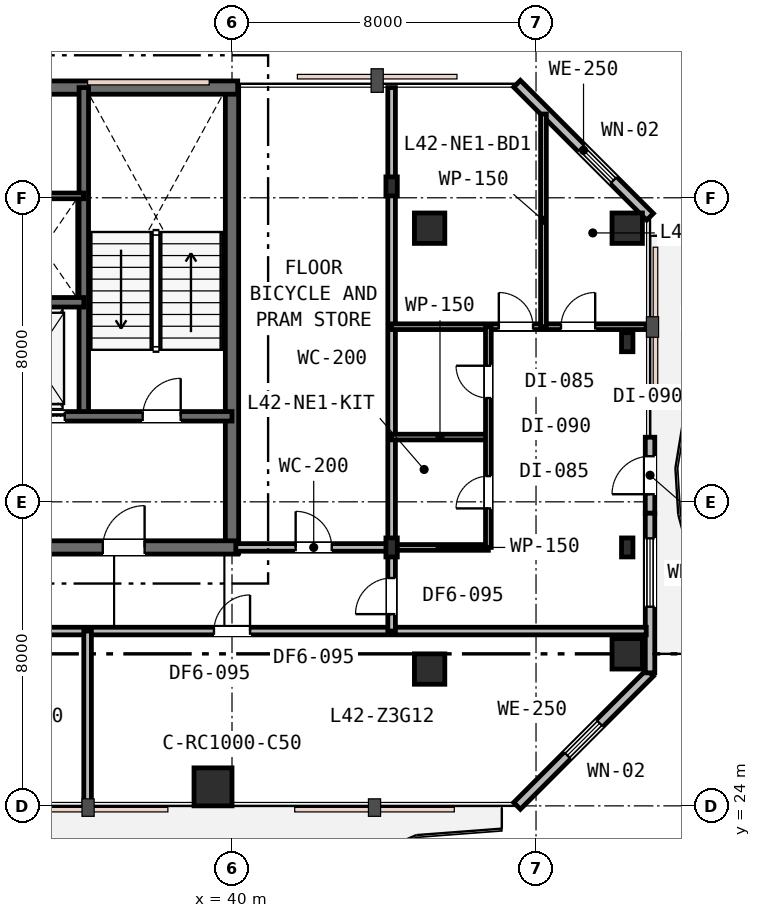
"""IFC4 building model, lengths in metres.
Left out: names, types, materials, properties, quantities, classifications, styles, units other than length and angle.
Written with IfcOpenShell. Run it as: python <this file> out.ifc"""

import sys

from ifc_helpers import new_model, si_unit, direction, frame, frame_2d, origin, origin_2d, place, context, subcontext, project, spatial, rectangle, i_section, extrude, element, fill, save


model = new_model("IFC4")
c1 = context("Model", 3, precision=1e-05, world=origin(), true_north=direction((0.0, 1.0)))
c2 = subcontext(c1, "Body", "Model", "MODEL_VIEW")
j1 = project(units=[si_unit("LENGTHUNIT", "METRE"), si_unit("PLANEANGLEUNIT", "RADIAN")], contexts=[c1])
p1 = place(None, origin())
s1 = spatial("IfcSite", under=j1, at=p1, CompositionType="ELEMENT")
p2 = place(p1, origin())
s2 = spatial("IfcBuilding", under=s1, at=p2, CompositionType="ELEMENT")
p3 = place(p2, frame((0.0, 0.0, 165.0)))
s3 = spatial("IfcBuildingStorey", under=s2, at=p3, CompositionType="ELEMENT", Elevation=165.0)
p4 = place(p3, frame((40.0, 30.65, 0.0), z_axis=(0.0, 0.0, 1.0), x_axis=(0.0, 1.0, 0.0)))
e1 = element("IfcWall", 1, at=p4, inside=s3, PredefinedType="SHEAR", context=c2, shape_type="SweptSolid", body=[
    extrude(rectangle(XDim=12.3, YDim=0.35, at=frame_2d((6.15, 0.0))), origin(), (0.0, 0.0, 1.0), 3.6),
])
p5 = place(p3, frame((15.85, 42.9, 0.0), z_axis=(0.0, 0.0, 1.0), x_axis=(1.0, 0.0, 0.0)))
e2 = element("IfcWall", 2, at=p5, inside=s3, PredefinedType="SHEAR", context=c2, shape_type="SweptSolid", body=[
    extrude(rectangle(XDim=24.3, YDim=0.35, at=frame_2d((12.15, 0.0))), origin(), (0.0, 0.0, 1.0), 3.6),
])
p6 = place(p3, frame((28.95, 30.8, 0.0), z_axis=(0.0, 0.0, 1.0), x_axis=(1.0, 0.0, 0.0)))
e3 = element("IfcWall", 3, at=p6, inside=s3, PredefinedType="SHEAR", context=c2, shape_type="SweptSolid", body=[
    extrude(rectangle(XDim=11.2, YDim=0.35, at=frame_2d((5.6, 0.0))), origin(), (0.0, 0.0, 1.0), 3.6),
])
p7 = place(p6, frame((7.65, 0.0, 0.0)))
e4 = element("IfcOpeningElement", 4, at=p7, cuts=e3, PredefinedType="OPENING", context=c2, shape_type="SweptSolid", body=[
    extrude(rectangle(XDim=1.1, YDim=2.15, at=frame_2d((0.55, 1.075))), frame((0.0, 0.185, 0.0), z_axis=(0.0, -1.0, 0.0), x_axis=(1.0, 0.0, 0.0)), (0.0, 0.0, 1.0), 0.37),
])
p8 = place(p3, frame((36.1, 34.25, 0.0), z_axis=(0.0, 0.0, 1.0), x_axis=(0.0, 1.0, 0.0)))
e5 = element("IfcWall", 5, at=p8, inside=s3, PredefinedType="SHEAR", context=c2, shape_type="SweptSolid", body=[
    extrude(rectangle(XDim=8.65, YDim=0.25, at=frame_2d((4.325, 0.0))), origin(), (0.0, 0.0, 1.0), 3.6),
])
p9 = place(p3, frame((33.95, 34.25, 0.0), z_axis=(0.0, 0.0, 1.0), x_axis=(1.0, 0.0, 0.0)))
e6 = element("IfcWall", 6, at=p9, inside=s3, PredefinedType="SHEAR", context=c2, shape_type="SweptSolid", body=[
    extrude(rectangle(XDim=6.05, YDim=0.25, at=frame_2d((3.025, 0.0))), origin(), (0.0, 0.0, 1.0), 3.6),
])
p10 = place(p9, frame((3.7, 0.0, 0.0)))
e7 = element("IfcOpeningElement", 7, at=p10, cuts=e6, PredefinedType="OPENING", context=c2, shape_type="SweptSolid", body=[
    extrude(rectangle(XDim=1.0, YDim=2.15, at=frame_2d((0.5, 1.075))), frame((0.0, 0.135, 0.0), z_axis=(0.0, -1.0, 0.0), x_axis=(1.0, 0.0, 0.0)), (0.0, 0.0, 1.0), 0.27),
])
p11 = place(p9, frame((0.55, 0.0, 0.0)))
e8 = element("IfcOpeningElement", 8, at=p11, cuts=e6, PredefinedType="OPENING", context=c2, shape_type="SweptSolid", body=[
    extrude(rectangle(XDim=1.1, YDim=2.15, at=frame_2d((0.55, 1.075))), frame((0.0, 0.135, 0.0), z_axis=(0.0, -1.0, 0.0), x_axis=(1.0, 0.0, 0.0)), (0.0, 0.0, 1.0), 0.27),
])
p12 = place(p3, frame((19.9, 37.25, 0.0), z_axis=(0.0, 0.0, 1.0), x_axis=(1.0, 0.0, 0.0)))
e9 = element("IfcWall", 9, at=p12, inside=s3, PredefinedType="SHEAR", context=c2, shape_type="SweptSolid", body=[
    extrude(rectangle(XDim=16.2, YDim=0.25, at=frame_2d((8.1, 0.0))), origin(), (0.0, 0.0, 1.0), 3.6),
])
p13 = place(p12, frame((12.55, 0.0, 0.0)))
e10 = element("IfcOpeningElement", 10, at=p13, cuts=e9, PredefinedType="OPENING", context=c2, shape_type="SweptSolid", body=[
    extrude(rectangle(XDim=0.9, YDim=2.15, at=frame_2d((0.45, 1.075))), frame((0.0, 0.135, 0.0), z_axis=(0.0, -1.0, 0.0), x_axis=(1.0, 0.0, 0.0)), (0.0, 0.0, 1.0), 0.27),
])
p14 = place(p12, frame((2.5, 0.0, 0.0)))
e11 = element("IfcOpeningElement", 11, at=p14, cuts=e9, PredefinedType="OPENING", context=c2, shape_type="SweptSolid", body=[
    extrude(rectangle(XDim=1.05, YDim=2.15, at=frame_2d((0.525, 1.075))), frame((0.0, 0.135, 0.0), z_axis=(0.0, -1.0, 0.0), x_axis=(1.0, 0.0, 0.0)), (0.0, 0.0, 1.0), 0.27),
])
p15 = place(p12, frame((4.4, 0.0, 0.0)))
e12 = element("IfcOpeningElement", 12, at=p15, cuts=e9, PredefinedType="OPENING", context=c2, shape_type="SweptSolid", body=[
    extrude(rectangle(XDim=1.05, YDim=2.15, at=frame_2d((0.525, 1.075))), frame((0.0, 0.135, 0.0), z_axis=(0.0, -1.0, 0.0), x_axis=(1.0, 0.0, 0.0)), (0.0, 0.0, 1.0), 0.27),
])
p16 = place(p12, frame((6.3, 0.0, 0.0)))
e13 = element("IfcOpeningElement", 13, at=p16, cuts=e9, PredefinedType="OPENING", context=c2, shape_type="SweptSolid", body=[
    extrude(rectangle(XDim=1.05, YDim=2.15, at=frame_2d((0.525, 1.075))), frame((0.0, 0.135, 0.0), z_axis=(0.0, -1.0, 0.0), x_axis=(1.0, 0.0, 0.0)), (0.0, 0.0, 1.0), 0.27),
])
p17 = place(p3, frame((39.5, 24.5, 0.0), z_axis=(0.0, 0.0, 1.0), x_axis=(1.0, 0.0, 0.0)))
e14 = element("IfcColumn", 14, at=p17, inside=s3, PredefinedType="COLUMN", context=c2, shape_type="SweptSolid", body=[
    extrude(rectangle(XDim=1.0, YDim=1.0, at=origin_2d()), origin(), (0.0, 0.0, 1.0), 3.6),
])
for number, where, z_axis, x_axis in (
    (15, (45.2, 27.6, 0.0), (0.0, 0.0, 1.0), (1.0, 0.0, 0.0)),
    (16, (45.2, 39.2, 0.0), (0.0, 0.0, 1.0), (1.0, 0.0, 0.0)),
    (17, (50.4, 28.0, 0.0), (0.0, 0.0, 1.0), (1.0, 0.0, 0.0)),
    (18, (50.4, 39.2, 0.0), (0.0, 0.0, 1.0), (1.0, 0.0, 0.0)),
):
    element("IfcColumn", number, at=place(p3, frame(where, z_axis=z_axis, x_axis=x_axis)), inside=s3, PredefinedType="COLUMN", context=c2, shape_type="SweptSolid", body=[
        extrude(rectangle(XDim=0.8, YDim=0.8, at=origin_2d()), origin(), (0.0, 0.0, 1.0), 3.6),
    ])
for number, where, z_axis, x_axis in (
    (19, (44.2, 30.8, 0.0), (0.0, 0.0, 1.0), (1.0, 0.0, 0.0)),
    (20, (44.2, 40.3, 0.0), (0.0, 0.0, 1.0), (1.0, 0.0, 0.0)),
    (21, (50.4, 30.8, 0.0), (0.0, 0.0, 1.0), (1.0, 0.0, 0.0)),
    (22, (50.4, 36.2, 0.0), (0.0, 0.0, 1.0), (1.0, 0.0, 0.0)),
):
    element("IfcColumn", number, at=place(p3, frame(where, z_axis=z_axis, x_axis=x_axis)), inside=s3, PredefinedType="COLUMN", context=c2, shape_type="SweptSolid", body=[
        extrude(i_section(OverallWidth=0.3, OverallDepth=0.5, WebThickness=0.015, FlangeThickness=0.028, FilletRadius=0.027, at=origin_2d()), origin(), (0.0, 0.0, 1.0), 3.6),
    ])
p18 = place(p3, frame((47.5, 24.0, 0.0), z_axis=(0.0, 0.0, 1.0), x_axis=(0.707106781187, 0.707106781187, 0.0)))
e23 = element("IfcWall", 23, at=p18, inside=s3, PredefinedType="STANDARD", context=c2, shape_type="SweptSolid", body=[
    extrude(rectangle(XDim=4.95, YDim=0.25, at=frame_2d((2.475, 0.0))), origin(), (0.0, 0.0, 1.0), 3.33),
])
p19 = place(p18, frame((1.875, 0.0, 0.85)))
e24 = element("IfcOpeningElement", 24, at=p19, cuts=e23, PredefinedType="OPENING", context=c2, shape_type="SweptSolid", body=[
    extrude(rectangle(XDim=1.2, YDim=1.6, at=frame_2d((0.6, 0.8))), frame((0.0, 0.135, 0.0), z_axis=(0.0, -1.0, 0.0), x_axis=(1.0, 0.0, 0.0)), (0.0, 0.0, 1.0), 0.27),
])
p20 = place(p3, frame((51.0, 31.7, 0.0), z_axis=(0.0, 0.0, 1.0), x_axis=(0.0, 1.0, 0.0)))
e25 = element("IfcWall", 25, at=p20, inside=s3, PredefinedType="STANDARD", context=c2, shape_type="SweptSolid", body=[
    extrude(rectangle(XDim=2.0, YDim=0.25, at=frame_2d((1.0, 0.0))), origin(), (0.0, 0.0, 1.0), 3.33),
])
p21 = place(p20, frame((0.5, 0.0, 0.0)))
e26 = element("IfcOpeningElement", 26, at=p21, cuts=e25, PredefinedType="OPENING", context=c2, shape_type="SweptSolid", body=[
    extrude(rectangle(XDim=1.0, YDim=2.15, at=frame_2d((0.5, 1.075))), frame((0.0, 0.135, 0.0), z_axis=(0.0, -1.0, 0.0), x_axis=(1.0, 0.0, 0.0)), (0.0, 0.0, 1.0), 0.27),
])
p22 = place(p3, frame((51.0, 27.5, 0.0), z_axis=(0.0, 0.0, 1.0), x_axis=(0.0, 1.0, 0.0)))
e27 = element("IfcWall", 27, at=p22, inside=s3, PredefinedType="STANDARD", context=c2, shape_type="SweptSolid", body=[
    extrude(rectangle(XDim=4.2, YDim=0.25, at=frame_2d((2.1, 0.0))), origin(), (0.0, 0.0, 1.0), 3.33),
])
p23 = place(p22, frame((1.74, 0.0, 0.75)))
e28 = element("IfcOpeningElement", 28, at=p23, cuts=e27, PredefinedType="OPENING", context=c2, shape_type="SweptSolid", body=[
    extrude(rectangle(XDim=1.8, YDim=1.85, at=frame_2d((0.9, 0.925))), frame((0.0, 0.135, 0.0), z_axis=(0.0, -1.0, 0.0), x_axis=(1.0, 0.0, 0.0)), (0.0, 0.0, 1.0), 0.27),
])
p24 = place(p3, frame((51.0, 39.5, 0.0), z_axis=(0.0, 0.0, 1.0), x_axis=(-0.707106781187, 0.707106781187, 0.0)))
e29 = element("IfcWall", 29, at=p24, inside=s3, PredefinedType="STANDARD", context=c2, shape_type="SweptSolid", body=[
    extrude(rectangle(XDim=4.95, YDim=0.25, at=frame_2d((2.475, 0.0))), origin(), (0.0, 0.0, 1.0), 3.33),
])
p25 = place(p24, frame((1.357, 0.0, 0.85)))
e30 = element("IfcOpeningElement", 30, at=p25, cuts=e29, PredefinedType="OPENING", context=c2, shape_type="SweptSolid", body=[
    extrude(rectangle(XDim=1.2, YDim=1.6, at=frame_2d((0.6, 0.8))), frame((0.0, 0.135, 0.0), z_axis=(0.0, -1.0, 0.0), x_axis=(1.0, 0.0, 0.0)), (0.0, 0.0, 1.0), 0.27),
])
p26 = place(p3, frame((34.05, 40.05, 0.0), z_axis=(0.0, 0.0, 1.0), x_axis=(1.0, 0.0, 0.0)))
e31 = element("IfcWall", 31, at=p26, inside=s3, PredefinedType="PARTITIONING", context=c2, shape_type="SweptSolid", body=[
    extrude(rectangle(XDim=2.05, YDim=0.15, at=frame_2d((1.025, 0.0))), origin(), (0.0, 0.0, 1.0), 3.33),
])
p27 = place(p3, frame((13.6, 28.6, 0.0), z_axis=(0.0, 0.0, 1.0), x_axis=(1.0, 0.0, 0.0)))
e32 = element("IfcWall", 32, at=p27, inside=s3, PredefinedType="PARTITIONING", context=c2, shape_type="SweptSolid", body=[
    extrude(rectangle(XDim=37.3, YDim=0.2, at=frame_2d((18.65, 0.0))), origin(), (0.0, 0.0, 1.0), 2.93),
])
p28 = place(p27, frame((16.025, 0.0, 0.0)))
e33 = element("IfcOpeningElement", 33, at=p28, cuts=e32, PredefinedType="OPENING", context=c2, shape_type="SweptSolid", body=[
    extrude(rectangle(XDim=0.95, YDim=2.15, at=frame_2d((0.475, 1.075))), frame((0.0, 0.11, 0.0), z_axis=(0.0, -1.0, 0.0), x_axis=(1.0, 0.0, 0.0)), (0.0, 0.0, 1.0), 0.22),
])
p29 = place(p27, frame((25.925, 0.0, 0.0)))
e34 = element("IfcOpeningElement", 34, at=p29, cuts=e32, PredefinedType="OPENING", context=c2, shape_type="SweptSolid", body=[
    extrude(rectangle(XDim=0.95, YDim=2.15, at=frame_2d((0.475, 1.075))), frame((0.0, 0.11, 0.0), z_axis=(0.0, -1.0, 0.0), x_axis=(1.0, 0.0, 0.0)), (0.0, 0.0, 1.0), 0.22),
])
p30 = place(p3, frame((40.1, 30.8, 0.0), z_axis=(0.0, 0.0, 1.0), x_axis=(1.0, 0.0, 0.0)))
e35 = element("IfcWall", 35, at=p30, inside=s3, PredefinedType="PARTITIONING", context=c2, shape_type="SweptSolid", body=[
    extrude(rectangle(XDim=4.1, YDim=0.2, at=frame_2d((2.05, 0.0))), origin(), (0.0, 0.0, 1.0), 2.93),
])
p31 = place(p30, frame((1.575, 0.0, 0.0)))
e36 = element("IfcOpeningElement", 36, at=p31, cuts=e35, PredefinedType="OPENING", context=c2, shape_type="SweptSolid", body=[
    extrude(rectangle(XDim=0.95, YDim=2.15, at=frame_2d((0.475, 1.075))), frame((0.0, 0.11, 0.0), z_axis=(0.0, -1.0, 0.0), x_axis=(1.0, 0.0, 0.0)), (0.0, 0.0, 1.0), 0.22),
])
p32 = place(p3, frame((44.2, 28.6, 0.0), z_axis=(0.0, 0.0, 1.0), x_axis=(0.0, 1.0, 0.0)))
e37 = element("IfcWall", 37, at=p32, inside=s3, PredefinedType="PARTITIONING", context=c2, shape_type="SweptSolid", body=[
    extrude(rectangle(XDim=14.3, YDim=0.2, at=frame_2d((7.15, 0.0))), origin(), (0.0, 0.0, 1.0), 2.93),
])
p33 = place(p32, frame((0.445, 0.0, 0.0)))
e38 = element("IfcOpeningElement", 38, at=p33, cuts=e37, PredefinedType="OPENING", context=c2, shape_type="SweptSolid", body=[
    extrude(rectangle(XDim=0.95, YDim=2.15, at=frame_2d((0.475, 1.075))), frame((0.0, 0.11, 0.0), z_axis=(0.0, -1.0, 0.0), x_axis=(1.0, 0.0, 0.0)), (0.0, 0.0, 1.0), 0.22),
])
for number, where, z_axis, x_axis in (
    (39, (44.2, 30.8, 0.0), (0.0, 0.0, 1.0), (1.0, 0.0, 0.0)),
    (40, (44.2, 33.704, 0.0), (0.0, 0.0, 1.0), (1.0, 0.0, 0.0)),
):
    element("IfcWall", number, at=place(p3, frame(where, z_axis=z_axis, x_axis=x_axis)), inside=s3, PredefinedType="PARTITIONING", context=c2, shape_type="SweptSolid", body=[
        extrude(rectangle(XDim=2.546, YDim=0.15, at=frame_2d((1.273, 0.0))), origin(), (0.0, 0.0, 1.0), 2.93),
    ])
p34 = place(p3, frame((44.2, 36.608, 0.0), z_axis=(0.0, 0.0, 1.0), x_axis=(1.0, 0.0, 0.0)))
e41 = element("IfcWall", 41, at=p34, inside=s3, PredefinedType="PARTITIONING", context=c2, shape_type="SweptSolid", body=[
    extrude(rectangle(XDim=6.7, YDim=0.15, at=frame_2d((3.35, 0.0))), origin(), (0.0, 0.0, 1.0), 2.93),
])
p35 = place(p34, frame((2.821, 0.0, 0.0)))
e42 = element("IfcOpeningElement", 42, at=p35, cuts=e41, PredefinedType="OPENING", context=c2, shape_type="SweptSolid", body=[
    extrude(rectangle(XDim=0.9, YDim=2.15, at=frame_2d((0.45, 1.075))), frame((0.0, 0.085, 0.0), z_axis=(0.0, -1.0, 0.0), x_axis=(1.0, 0.0, 0.0)), (0.0, 0.0, 1.0), 0.17),
])
p36 = place(p34, frame((4.457, 0.0, 0.0)))
e43 = element("IfcOpeningElement", 43, at=p36, cuts=e41, PredefinedType="OPENING", context=c2, shape_type="SweptSolid", body=[
    extrude(rectangle(XDim=0.9, YDim=2.15, at=frame_2d((0.45, 1.075))), frame((0.0, 0.085, 0.0), z_axis=(0.0, -1.0, 0.0), x_axis=(1.0, 0.0, 0.0)), (0.0, 0.0, 1.0), 0.17),
])
p37 = place(p3, frame((46.746, 30.8, 0.0), z_axis=(0.0, 0.0, 1.0), x_axis=(0.0, 1.0, 0.0)))
e44 = element("IfcWall", 44, at=p37, inside=s3, PredefinedType="PARTITIONING", context=c2, shape_type="SweptSolid", body=[
    extrude(rectangle(XDim=5.808, YDim=0.15, at=frame_2d((2.904, 0.0))), origin(), (0.0, 0.0, 1.0), 2.93),
])
p38 = place(p37, frame((1.027, 0.0, 0.0)))
e45 = element("IfcOpeningElement", 45, at=p38, cuts=e44, PredefinedType="OPENING", context=c2, shape_type="SweptSolid", body=[
    extrude(rectangle(XDim=0.85, YDim=2.15, at=frame_2d((0.425, 1.075))), frame((0.0, 0.085, 0.0), z_axis=(0.0, -1.0, 0.0), x_axis=(1.0, 0.0, 0.0)), (0.0, 0.0, 1.0), 0.17),
])
p39 = place(p37, frame((3.931, 0.0, 0.0)))
e46 = element("IfcOpeningElement", 46, at=p39, cuts=e44, PredefinedType="OPENING", context=c2, shape_type="SweptSolid", body=[
    extrude(rectangle(XDim=0.85, YDim=2.15, at=frame_2d((0.425, 1.075))), frame((0.0, 0.085, 0.0), z_axis=(0.0, -1.0, 0.0), x_axis=(1.0, 0.0, 0.0)), (0.0, 0.0, 1.0), 0.17),
])
p40 = place(p3, frame((48.196, 36.608, 0.0), z_axis=(0.0, 0.0, 1.0), x_axis=(0.0, 1.0, 0.0)))
e47 = element("IfcWall", 47, at=p40, inside=s3, PredefinedType="PARTITIONING", context=c2, shape_type="SweptSolid", body=[
    extrude(rectangle(XDim=5.596, YDim=0.15, at=frame_2d((2.798, 0.0))), origin(), (0.0, 0.0, 1.0), 3.01),
])
p41 = place(p3, frame((36.2, 24.1, 0.0), z_axis=(0.0, 0.0, 1.0), x_axis=(0.0, 1.0, 0.0)))
e48 = element("IfcWall", 48, at=p41, inside=s3, PredefinedType="PARTITIONING", context=c2, shape_type="SweptSolid", body=[
    extrude(rectangle(XDim=4.5, YDim=0.2, at=frame_2d((2.25, 0.0))), origin(), (0.0, 0.0, 1.0), 3.01),
])
p42 = place(p19, origin())
e49 = element("IfcWindow", 49, at=p42, inside=s3, PartitioningType="SINGLE_PANEL", PredefinedType="WINDOW", context=c2, shape_type="SweptSolid", body=[
    extrude(rectangle(XDim=1.2, YDim=1.6, at=frame_2d((0.6, 0.8))), frame((0.0, 0.03, 0.0), z_axis=(0.0, -1.0, 0.0), x_axis=(1.0, 0.0, 0.0)), (0.0, 0.0, 1.0), 0.06),
])
fill(e24, e49)
p43 = place(p21, origin())
e50 = element("IfcDoor", 50, at=p43, inside=s3, OperationType="SINGLE_SWING_LEFT", PredefinedType="DOOR", context=c2, shape_type="SweptSolid", body=[
    extrude(rectangle(XDim=1.0, YDim=2.15, at=frame_2d((0.5, 1.075))), frame((0.0, 0.025, 0.0), z_axis=(0.0, -1.0, 0.0), x_axis=(1.0, 0.0, 0.0)), (0.0, 0.0, 1.0), 0.05),
])
fill(e26, e50)
p44 = place(p23, origin())
e51 = element("IfcWindow", 51, at=p44, inside=s3, PartitioningType="SINGLE_PANEL", PredefinedType="WINDOW", context=c2, shape_type="SweptSolid", body=[
    extrude(rectangle(XDim=1.8, YDim=1.85, at=frame_2d((0.9, 0.925))), frame((0.0, 0.03, 0.0), z_axis=(0.0, -1.0, 0.0), x_axis=(1.0, 0.0, 0.0)), (0.0, 0.0, 1.0), 0.06),
])
fill(e28, e51)
p45 = place(p25, origin())
e52 = element("IfcWindow", 52, at=p45, inside=s3, PartitioningType="SINGLE_PANEL", PredefinedType="WINDOW", context=c2, shape_type="SweptSolid", body=[
    extrude(rectangle(XDim=1.2, YDim=1.6, at=frame_2d((0.6, 0.8))), frame((0.0, 0.03, 0.0), z_axis=(0.0, -1.0, 0.0), x_axis=(1.0, 0.0, 0.0)), (0.0, 0.0, 1.0), 0.06),
])
fill(e30, e52)
p46 = place(p10, origin())
e53 = element("IfcDoor", 53, at=p46, inside=s3, OperationType="SINGLE_SWING_RIGHT", PredefinedType="DOOR", context=c2, shape_type="SweptSolid", body=[
    extrude(rectangle(XDim=1.0, YDim=2.15, at=frame_2d((0.5, 1.075))), frame((0.0, 0.025, 0.0), z_axis=(0.0, -1.0, 0.0), x_axis=(1.0, 0.0, 0.0)), (0.0, 0.0, 1.0), 0.05),
])
fill(e7, e53)
p47 = place(p7, origin())
e54 = element("IfcDoor", 54, at=p47, inside=s3, OperationType="SINGLE_SWING_RIGHT", PredefinedType="DOOR", context=c2, shape_type="SweptSolid", body=[
    extrude(rectangle(XDim=1.1, YDim=2.15, at=frame_2d((0.55, 1.075))), frame((0.0, 0.025, 0.0), z_axis=(0.0, -1.0, 0.0), x_axis=(1.0, 0.0, 0.0)), (0.0, 0.0, 1.0), 0.05),
])
fill(e4, e54)
p48 = place(p31, origin())
e55 = element("IfcDoor", 55, at=p48, inside=s3, OperationType="SINGLE_SWING_LEFT", PredefinedType="DOOR", context=c2, shape_type="SweptSolid", body=[
    extrude(rectangle(XDim=0.95, YDim=2.15, at=frame_2d((0.475, 1.075))), frame((0.0, 0.025, 0.0), z_axis=(0.0, -1.0, 0.0), x_axis=(1.0, 0.0, 0.0)), (0.0, 0.0, 1.0), 0.05),
])
fill(e36, e55)
p49 = place(p33, origin())
e56 = element("IfcDoor", 56, at=p49, inside=s3, OperationType="SINGLE_SWING_LEFT", PredefinedType="DOOR", context=c2, shape_type="SweptSolid", body=[
    extrude(rectangle(XDim=0.95, YDim=2.15, at=frame_2d((0.475, 1.075))), frame((0.0, 0.025, 0.0), z_axis=(0.0, -1.0, 0.0), x_axis=(1.0, 0.0, 0.0)), (0.0, 0.0, 1.0), 0.05),
])
fill(e38, e56)
p50 = place(p38, origin())
e57 = element("IfcDoor", 57, at=p50, inside=s3, OperationType="SINGLE_SWING_LEFT", PredefinedType="DOOR", context=c2, shape_type="SweptSolid", body=[
    extrude(rectangle(XDim=0.85, YDim=2.15, at=frame_2d((0.425, 1.075))), frame((0.0, 0.025, 0.0), z_axis=(0.0, -1.0, 0.0), x_axis=(1.0, 0.0, 0.0)), (0.0, 0.0, 1.0), 0.05),
])
fill(e45, e57)
p51 = place(p39, origin())
e58 = element("IfcDoor", 58, at=p51, inside=s3, OperationType="SINGLE_SWING_RIGHT", PredefinedType="DOOR", context=c2, shape_type="SweptSolid", body=[
    extrude(rectangle(XDim=0.85, YDim=2.15, at=frame_2d((0.425, 1.075))), frame((0.0, 0.025, 0.0), z_axis=(0.0, -1.0, 0.0), x_axis=(1.0, 0.0, 0.0)), (0.0, 0.0, 1.0), 0.05),
])
fill(e46, e58)
p52 = place(p35, origin())
e59 = element("IfcDoor", 59, at=p52, inside=s3, OperationType="SINGLE_SWING_LEFT", PredefinedType="DOOR", context=c2, shape_type="SweptSolid", body=[
    extrude(rectangle(XDim=0.9, YDim=2.15, at=frame_2d((0.45, 1.075))), frame((0.0, 0.025, 0.0), z_axis=(0.0, -1.0, 0.0), x_axis=(1.0, 0.0, 0.0)), (0.0, 0.0, 1.0), 0.05),
])
fill(e42, e59)
p53 = place(p36, origin())
e60 = element("IfcDoor", 60, at=p53, inside=s3, OperationType="SINGLE_SWING_RIGHT", PredefinedType="DOOR", context=c2, shape_type="SweptSolid", body=[
    extrude(rectangle(XDim=0.9, YDim=2.15, at=frame_2d((0.45, 1.075))), frame((0.0, 0.025, 0.0), z_axis=(0.0, -1.0, 0.0), x_axis=(1.0, 0.0, 0.0)), (0.0, 0.0, 1.0), 0.05),
])
fill(e43, e60)
p54 = place(p29, origin())
e61 = element("IfcDoor", 61, at=p54, inside=s3, OperationType="SINGLE_SWING_RIGHT", PredefinedType="DOOR", context=c2, shape_type="SweptSolid", body=[
    extrude(rectangle(XDim=0.95, YDim=2.15, at=frame_2d((0.475, 1.075))), frame((0.0, 0.025, 0.0), z_axis=(0.0, -1.0, 0.0), x_axis=(1.0, 0.0, 0.0)), (0.0, 0.0, 1.0), 0.05),
])
fill(e34, e61)
p55 = place(p11, origin())
e62 = element("IfcDoor", 62, at=p55, inside=s3, OperationType="DOUBLE_DOOR_SLIDING", PredefinedType="DOOR", context=c2, shape_type="SweptSolid", body=[
    extrude(rectangle(XDim=1.1, YDim=2.15, at=frame_2d((0.55, 1.075))), frame((0.0, 0.025, 0.0), z_axis=(0.0, -1.0, 0.0), x_axis=(1.0, 0.0, 0.0)), (0.0, 0.0, 1.0), 0.05),
])
fill(e8, e62)
save(model, sys.argv[1])
